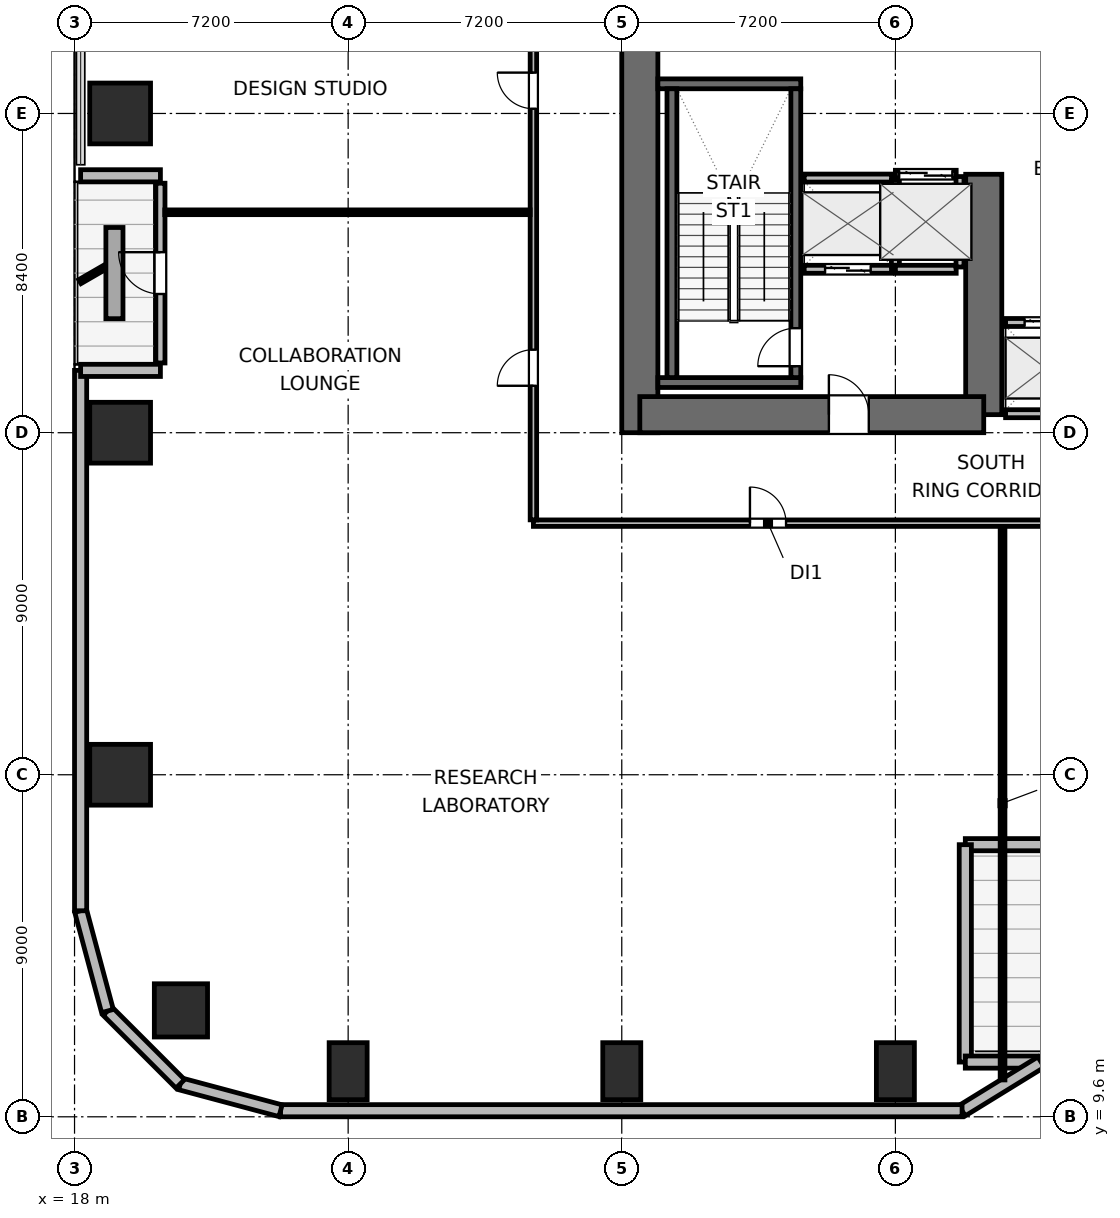
"""IFC4 building model, lengths in metres.
Left out: names, types, materials, properties, quantities, classifications, styles, units other than length and angle.
Written with IfcOpenShell. Run it as: python <this file> out.ifc"""

import sys

from ifc_helpers import new_model, si_unit, direction, frame, frame_2d, origin, origin_2d, place, context, subcontext, project, spatial, rectangle, circle, extrude, element, fill, save


model = new_model("IFC4")
c1 = context("Model", 3, precision=1e-05, world=origin(), true_north=direction((0.0, 1.0)))
c2 = subcontext(c1, "Body", "Model", "MODEL_VIEW")
j1 = project(units=[si_unit("LENGTHUNIT", "METRE"), si_unit("PLANEANGLEUNIT", "RADIAN")], contexts=[c1])
p1 = place(None, origin())
s1 = spatial("IfcSite", under=j1, at=p1, CompositionType="ELEMENT")
p2 = place(p1, origin())
s2 = spatial("IfcBuilding", under=s1, at=p2, CompositionType="ELEMENT")
p3 = place(p2, frame((0.0, 0.0, 68.4)))
s3 = spatial("IfcBuildingStorey", under=s2, at=p3, CompositionType="ELEMENT", Elevation=68.4)
p4 = place(p3, frame((32.875, 27.6, 0.0), z_axis=(0.0, 0.0, 1.0), x_axis=(0.0, 1.0, 0.0)))
e1 = element("IfcWall", 1, at=p4, inside=s3, PredefinedType="SHEAR", context=c2, shape_type="SweptSolid", body=[
    extrude(rectangle(XDim=16.8, YDim=0.95, at=frame_2d((8.4, 0.0))), origin(), (0.0, 0.0, 1.0), 4.5),
])
p5 = place(p3, frame((41.925, 28.075, 0.0), z_axis=(0.0, 0.0, 1.0), x_axis=(0.0, 1.0, 0.0)))
e2 = element("IfcWall", 2, at=p5, inside=s3, PredefinedType="SHEAR", context=c2, shape_type="SweptSolid", body=[
    extrude(rectangle(XDim=6.325, YDim=0.95, at=frame_2d((3.163, 0.0))), origin(), (0.0, 0.0, 1.0), 4.5),
])
p6 = place(p3, frame((32.875, 28.075, 0.0), z_axis=(0.0, 0.0, 1.0), x_axis=(1.0, 0.0, 0.0)))
e3 = element("IfcWall", 3, at=p6, inside=s3, PredefinedType="SHEAR", context=c2, shape_type="SweptSolid", body=[
    extrude(rectangle(XDim=9.05, YDim=0.95, at=frame_2d((4.525, 0.0))), origin(), (0.0, 0.0, 1.0), 4.5),
])
p7 = place(p6, frame((4.975, 0.0, 0.0)))
e4 = element("IfcOpeningElement", 4, at=p7, cuts=e3, PredefinedType="OPENING", context=c2, shape_type="SweptSolid", body=[
    extrude(rectangle(XDim=1.05, YDim=2.04, at=frame_2d((0.525, 1.02))), frame((0.0, 0.485, 0.0), z_axis=(0.0, -1.0, 0.0), x_axis=(1.0, 0.0, 0.0)), (0.0, 0.0, 1.0), 0.97),
])
for number, where, z_axis, x_axis in (
    (5, (33.35, 28.92, 0.0), (0.0, 0.0, 1.0), (1.0, 0.0, 0.0)),
    (6, (33.35, 36.78, 0.0), (0.0, 0.0, 1.0), (1.0, 0.0, 0.0)),
):
    element("IfcWall", number, at=place(p3, frame(where, z_axis=z_axis, x_axis=x_axis)), inside=s3, PredefinedType="SHEAR", context=c2, shape_type="SweptSolid", body=[
        extrude(rectangle(XDim=3.76, YDim=0.26, at=frame_2d((1.88, 0.0))), origin(), (0.0, 0.0, 1.0), 4.5),
    ])
p8 = place(p3, frame((33.72, 29.05, 0.0), z_axis=(0.0, 0.0, 1.0), x_axis=(0.0, 1.0, 0.0)))
e7 = element("IfcWall", 7, at=p8, inside=s3, PredefinedType="SHEAR", context=c2, shape_type="SweptSolid", body=[
    extrude(rectangle(XDim=7.6, YDim=0.26, at=frame_2d((3.8, 0.0))), origin(), (0.0, 0.0, 1.0), 4.5),
])
p9 = place(p3, frame((36.98, 29.05, 0.0), z_axis=(0.0, 0.0, 1.0), x_axis=(0.0, 1.0, 0.0)))
e8 = element("IfcWall", 8, at=p9, inside=s3, PredefinedType="SHEAR", context=c2, shape_type="SweptSolid", body=[
    extrude(rectangle(XDim=7.6, YDim=0.26, at=frame_2d((3.8, 0.0))), origin(), (0.0, 0.0, 1.0), 4.5),
])
p10 = place(p9, frame((0.3, 0.0, 0.0)))
e9 = element("IfcOpeningElement", 9, at=p10, cuts=e8, PredefinedType="OPENING", context=c2, shape_type="SweptSolid", body=[
    extrude(rectangle(XDim=1.0, YDim=2.04, at=frame_2d((0.5, 1.02))), frame((0.0, 0.14, 0.0), z_axis=(0.0, -1.0, 0.0), x_axis=(1.0, 0.0, 0.0)), (0.0, 0.0, 1.0), 0.28),
])
p11 = place(p3, frame((20.8, 12.4, 0.0), z_axis=(0.0, 0.0, 1.0), x_axis=(1.0, 0.0, 0.0)))
e10 = element("IfcColumn", 10, at=p11, inside=s3, PredefinedType="COLUMN", context=c2, shape_type="SweptSolid", body=[
    extrude(circle(Radius=0.7, at=origin_2d()), origin(), (0.0, 0.0, 1.0), 4.5),
])
for number, where, z_axis, x_axis in (
    (11, (25.2, 10.8, 0.0), (0.0, 0.0, 1.0), (1.0, 0.0, 0.0)),
    (12, (32.4, 10.8, 0.0), (0.0, 0.0, 1.0), (1.0, 0.0, 0.0)),
    (13, (39.6, 10.8, 0.0), (0.0, 0.0, 1.0), (1.0, 0.0, 0.0)),
):
    element("IfcColumn", number, at=place(p3, frame(where, z_axis=z_axis, x_axis=x_axis)), inside=s3, PredefinedType="COLUMN", context=c2, shape_type="SweptSolid", body=[
        extrude(rectangle(XDim=1.0, YDim=1.5, at=origin_2d()), origin(), (0.0, 0.0, 1.0), 4.5),
    ])
for number, where, z_axis, x_axis in (
    (14, (19.2, 18.6, 0.0), (0.0, 0.0, 1.0), (1.0, 0.0, 0.0)),
    (15, (19.2, 27.6, 0.0), (0.0, 0.0, 1.0), (1.0, 0.0, 0.0)),
    (16, (19.2, 36.0, 0.0), (0.0, 0.0, 1.0), (1.0, 0.0, 0.0)),
):
    element("IfcColumn", number, at=place(p3, frame(where, z_axis=z_axis, x_axis=x_axis)), inside=s3, PredefinedType="COLUMN", context=c2, shape_type="SweptSolid", body=[
        extrude(rectangle(XDim=1.6, YDim=1.6, at=origin_2d()), origin(), (0.0, 0.0, 1.0), 4.5),
    ])
p12 = place(p3, frame((54.56, 16.76, 0.0), z_axis=(0.0, 0.0, 1.0), x_axis=(-1.0, 0.0, 0.0)))
e17 = element("IfcWall", 17, at=p12, inside=s3, PredefinedType="SOLIDWALL", context=c2, shape_type="SweptSolid", body=[
    extrude(rectangle(XDim=13.12, YDim=0.32, at=frame_2d((6.56, 0.0))), origin(), (0.0, 0.0, 1.0), 3.53),
])
p13 = place(p3, frame((41.44, 16.76, 0.0), z_axis=(0.0, 0.0, 1.0), x_axis=(0.0, -1.0, 0.0)))
e18 = element("IfcWall", 18, at=p13, inside=s3, PredefinedType="SOLIDWALL", context=c2, shape_type="SweptSolid", body=[
    extrude(rectangle(XDim=5.72, YDim=0.32, at=frame_2d((2.86, 0.0))), origin(), (0.0, 0.0, 1.0), 3.475),
])
p14 = place(p3, frame((41.44, 11.04, 0.0), z_axis=(0.0, 0.0, 1.0), x_axis=(1.0, 0.0, 0.0)))
e19 = element("IfcWall", 19, at=p14, inside=s3, PredefinedType="SOLIDWALL", context=c2, shape_type="SweptSolid", body=[
    extrude(rectangle(XDim=1.995, YDim=0.32, at=frame_2d((0.998, 0.0))), origin(), (0.0, 0.0, 1.0), 3.475),
])
p15 = place(p3, frame((43.435, 11.04, 0.0), z_axis=(0.0, 0.0, 1.0), x_axis=(-0.8516617488, -0.524091848469, 0.0)))
e20 = element("IfcWall", 20, at=p15, inside=s3, PredefinedType="SOLIDWALL", context=c2, shape_type="SweptSolid", body=[
    extrude(rectangle(XDim=2.442, YDim=0.32, at=frame_2d((1.221, 0.0))), origin(), (0.0, 0.0, 1.0), 4.24),
])
p16 = place(p3, frame((41.355, 9.76, 0.0), z_axis=(0.0, 0.0, 1.0), x_axis=(-1.0, 0.0, 0.0)))
e21 = element("IfcWall", 21, at=p16, inside=s3, PredefinedType="SOLIDWALL", context=c2, shape_type="SweptSolid", body=[
    extrude(rectangle(XDim=17.934, YDim=0.32, at=frame_2d((8.967, 0.0))), origin(), (0.0, 0.0, 1.0), 4.24),
])
p17 = place(p3, frame((23.421, 9.76, 0.0), z_axis=(0.0, 0.0, 1.0), x_axis=(-0.965964405026, 0.25867502435, 0.0)))
e22 = element("IfcWall", 22, at=p17, inside=s3, PredefinedType="SOLIDWALL", context=c2, shape_type="SweptSolid", body=[
    extrude(rectangle(XDim=2.731, YDim=0.32, at=frame_2d((1.366, 0.0))), origin(), (0.0, 0.0, 1.0), 4.24),
])
p18 = place(p3, frame((20.783, 10.467, 0.0), z_axis=(0.0, 0.0, 1.0), x_axis=(-0.707106781187, 0.707106781187, 0.0)))
e23 = element("IfcWall", 23, at=p18, inside=s3, PredefinedType="SOLIDWALL", context=c2, shape_type="SweptSolid", body=[
    extrude(rectangle(XDim=2.71, YDim=0.32, at=frame_2d((1.355, 0.0))), origin(), (0.0, 0.0, 1.0), 4.24),
])
p19 = place(p3, frame((18.866, 12.383, 0.0), z_axis=(0.0, 0.0, 1.0), x_axis=(-0.25869736047, 0.965958423373, 0.0)))
e24 = element("IfcWall", 24, at=p19, inside=s3, PredefinedType="SOLIDWALL", context=c2, shape_type="SweptSolid", body=[
    extrude(rectangle(XDim=2.731, YDim=0.32, at=frame_2d((1.366, 0.0))), origin(), (0.0, 0.0, 1.0), 4.24),
])
p20 = place(p3, frame((18.16, 15.021, 0.0), z_axis=(0.0, 0.0, 1.0), x_axis=(0.0, 1.0, 0.0)))
e25 = element("IfcWall", 25, at=p20, inside=s3, PredefinedType="SOLIDWALL", context=c2, shape_type="SweptSolid", body=[
    extrude(rectangle(XDim=14.219, YDim=0.32, at=frame_2d((7.109, 0.0))), origin(), (0.0, 0.0, 1.0), 4.24),
])
p21 = place(p3, frame((18.16, 29.24, 0.0), z_axis=(0.0, 0.0, 1.0), x_axis=(1.0, 0.0, 0.0)))
e26 = element("IfcWall", 26, at=p21, inside=s3, PredefinedType="SOLIDWALL", context=c2, shape_type="SweptSolid", body=[
    extrude(rectangle(XDim=2.1, YDim=0.32, at=frame_2d((1.05, 0.0))), origin(), (0.0, 0.0, 1.0), 3.475),
])
p22 = place(p3, frame((20.26, 29.435, 0.0), z_axis=(0.0, 0.0, 1.0), x_axis=(0.0, 1.0, 0.0)))
e27 = element("IfcWall", 27, at=p22, inside=s3, PredefinedType="SOLIDWALL", context=c2, shape_type="SweptSolid", body=[
    extrude(rectangle(XDim=4.73, YDim=0.24, at=frame_2d((2.365, 0.0))), origin(), (0.0, 0.0, 1.0), 3.762),
])
p23 = place(p22, frame((1.815, 0.0, 0.0)))
e28 = element("IfcOpeningElement", 28, at=p23, cuts=e27, PredefinedType="OPENING", context=c2, shape_type="SweptSolid", body=[
    extrude(rectangle(XDim=1.1, YDim=2.04, at=frame_2d((0.55, 1.02))), frame((0.0, 0.13, 0.0), z_axis=(0.0, -1.0, 0.0), x_axis=(1.0, 0.0, 0.0)), (0.0, 0.0, 1.0), 0.26),
])
p24 = place(p3, frame((20.26, 34.36, 0.0), z_axis=(0.0, 0.0, 1.0), x_axis=(-1.0, 0.0, 0.0)))
e29 = element("IfcWall", 29, at=p24, inside=s3, PredefinedType="SOLIDWALL", context=c2, shape_type="SweptSolid", body=[
    extrude(rectangle(XDim=2.1, YDim=0.32, at=frame_2d((1.05, 0.0))), origin(), (0.0, 0.0, 1.0), 3.475),
])
p25 = place(p3, frame((37.2, 31.9, 0.0), z_axis=(0.0, 0.0, 1.0), x_axis=(1.0, 0.0, 0.0)))
e30 = element("IfcWall", 30, at=p25, inside=s3, PredefinedType="PARTITIONING", context=c2, shape_type="SweptSolid", body=[
    extrude(rectangle(XDim=2.3, YDim=0.21, at=frame_2d((1.15, 0.0))), origin(), (0.0, 0.0, 1.0), 4.24),
])
p26 = place(p25, frame((0.55, 0.0, 0.0)))
e31 = element("IfcOpeningElement", 31, at=p26, cuts=e30, PredefinedType="OPENING", context=c2, shape_type="SweptSolid", body=[
    extrude(rectangle(XDim=1.2, YDim=2.04, at=frame_2d((0.6, 1.02))), frame((0.0, 0.115, 0.0), z_axis=(0.0, -1.0, 0.0), x_axis=(1.0, 0.0, 0.0)), (0.0, 0.0, 1.0), 0.23),
])
p27 = place(p3, frame((37.2, 34.3, 0.0), z_axis=(0.0, 0.0, 1.0), x_axis=(1.0, 0.0, 0.0)))
e32 = element("IfcWall", 32, at=p27, inside=s3, PredefinedType="PARTITIONING", context=c2, shape_type="SweptSolid", body=[
    extrude(rectangle(XDim=2.3, YDim=0.21, at=frame_2d((1.15, 0.0))), origin(), (0.0, 0.0, 1.0), 4.24),
])
p28 = place(p3, frame((39.6, 31.96, 0.0), z_axis=(0.0, 0.0, 1.0), x_axis=(0.0, 1.0, 0.0)))
e33 = element("IfcWall", 33, at=p28, inside=s3, PredefinedType="PARTITIONING", context=c2, shape_type="SweptSolid", body=[
    extrude(rectangle(XDim=2.28, YDim=0.21, at=frame_2d((1.14, 0.0))), origin(), (0.0, 0.0, 1.0), 4.24),
])
p29 = place(p3, frame((39.6, 34.4, 0.0), z_axis=(0.0, 0.0, 1.0), x_axis=(1.0, 0.0, 0.0)))
e34 = element("IfcWall", 34, at=p29, inside=s3, PredefinedType="PARTITIONING", context=c2, shape_type="SweptSolid", body=[
    extrude(rectangle(XDim=1.6, YDim=0.21, at=frame_2d((0.8, 0.0))), origin(), (0.0, 0.0, 1.0), 4.24),
])
p30 = place(p29, frame((0.1, 0.0, 0.0)))
e35 = element("IfcOpeningElement", 35, at=p30, cuts=e34, PredefinedType="OPENING", context=c2, shape_type="SweptSolid", body=[
    extrude(rectangle(XDim=1.4, YDim=2.06, at=frame_2d((0.7, 1.03))), frame((0.0, 0.115, 0.0), z_axis=(0.0, -1.0, 0.0), x_axis=(1.0, 0.0, 0.0)), (0.0, 0.0, 1.0), 0.23),
])
p31 = place(p3, frame((39.6, 31.9, 0.0), z_axis=(0.0, 0.0, 1.0), x_axis=(1.0, 0.0, 0.0)))
e36 = element("IfcWall", 36, at=p31, inside=s3, PredefinedType="PARTITIONING", context=c2, shape_type="SweptSolid", body=[
    extrude(rectangle(XDim=1.6, YDim=0.21, at=frame_2d((0.8, 0.0))), origin(), (0.0, 0.0, 1.0), 4.24),
])
p32 = place(p3, frame((41.3, 31.96, 0.0), z_axis=(0.0, 0.0, 1.0), x_axis=(0.0, 1.0, 0.0)))
e37 = element("IfcWall", 37, at=p32, inside=s3, PredefinedType="PARTITIONING", context=c2, shape_type="SweptSolid", body=[
    extrude(rectangle(XDim=2.38, YDim=0.21, at=frame_2d((1.19, 0.0))), origin(), (0.0, 0.0, 1.0), 4.24),
])
p33 = place(p3, frame((42.5, 30.5, 0.0), z_axis=(0.0, 0.0, 1.0), x_axis=(1.0, 0.0, 0.0)))
e38 = element("IfcWall", 38, at=p33, inside=s3, PredefinedType="PARTITIONING", context=c2, shape_type="SweptSolid", body=[
    extrude(rectangle(XDim=2.1, YDim=0.21, at=frame_2d((1.05, 0.0))), origin(), (0.0, 0.0, 1.0), 4.24),
])
p34 = place(p33, frame((0.5, 0.0, 0.0)))
e39 = element("IfcOpeningElement", 39, at=p34, cuts=e38, PredefinedType="OPENING", context=c2, shape_type="SweptSolid", body=[
    extrude(rectangle(XDim=1.1, YDim=2.04, at=frame_2d((0.55, 1.02))), frame((0.0, 0.115, 0.0), z_axis=(0.0, -1.0, 0.0), x_axis=(1.0, 0.0, 0.0)), (0.0, 0.0, 1.0), 0.23),
])
p35 = place(p3, frame((42.5, 28.1, 0.0), z_axis=(0.0, 0.0, 1.0), x_axis=(1.0, 0.0, 0.0)))
e40 = element("IfcWall", 40, at=p35, inside=s3, PredefinedType="PARTITIONING", context=c2, shape_type="SweptSolid", body=[
    extrude(rectangle(XDim=2.1, YDim=0.21, at=frame_2d((1.05, 0.0))), origin(), (0.0, 0.0, 1.0), 3.125),
])
p36 = place(p3, frame((30.075, 25.22, 0.0), z_axis=(0.0, 0.0, 1.0), x_axis=(1.0, 0.0, 0.0)))
e41 = element("IfcWall", 41, at=p36, inside=s3, PredefinedType="PARTITIONING", context=c2, shape_type="SweptSolid", body=[
    extrude(rectangle(XDim=35.85, YDim=0.17, at=frame_2d((17.925, 0.0))), origin(), (0.0, 0.0, 1.0), 4.24),
])
p37 = place(p36, frame((5.698, 0.0, 0.0)))
e42 = element("IfcOpeningElement", 42, at=p37, cuts=e41, PredefinedType="OPENING", context=c2, shape_type="SweptSolid", body=[
    extrude(rectangle(XDim=0.95, YDim=2.04, at=frame_2d((0.475, 1.02))), frame((0.0, 0.095, 0.0), z_axis=(0.0, -1.0, 0.0), x_axis=(1.0, 0.0, 0.0)), (0.0, 0.0, 1.0), 0.19),
])
p38 = place(p36, frame((17.445, 0.0, 0.0)))
e43 = element("IfcOpeningElement", 43, at=p38, cuts=e41, PredefinedType="OPENING", context=c2, shape_type="SweptSolid", body=[
    extrude(rectangle(XDim=0.95, YDim=2.04, at=frame_2d((0.475, 1.02))), frame((0.0, 0.095, 0.0), z_axis=(0.0, -1.0, 0.0), x_axis=(1.0, 0.0, 0.0)), (0.0, 0.0, 1.0), 0.19),
])
p39 = place(p36, frame((29.198, 0.0, 0.0)))
e44 = element("IfcOpeningElement", 44, at=p39, cuts=e41, PredefinedType="OPENING", context=c2, shape_type="SweptSolid", body=[
    extrude(rectangle(XDim=0.95, YDim=2.04, at=frame_2d((0.475, 1.02))), frame((0.0, 0.095, 0.0), z_axis=(0.0, -1.0, 0.0), x_axis=(1.0, 0.0, 0.0)), (0.0, 0.0, 1.0), 0.19),
])
p40 = place(p3, frame((30.075, 25.307, 0.0), z_axis=(0.0, 0.0, 1.0), x_axis=(0.0, 1.0, 0.0)))
e45 = element("IfcWall", 45, at=p40, inside=s3, PredefinedType="PARTITIONING", context=c2, shape_type="SweptSolid", body=[
    extrude(rectangle(XDim=21.386, YDim=0.17, at=frame_2d((10.693, 0.0))), origin(), (0.0, 0.0, 1.0), 4.24),
])
p41 = place(p40, frame((3.528, 0.0, 0.0)))
e46 = element("IfcOpeningElement", 46, at=p41, cuts=e45, PredefinedType="OPENING", context=c2, shape_type="SweptSolid", body=[
    extrude(rectangle(XDim=0.95, YDim=2.04, at=frame_2d((0.475, 1.02))), frame((0.0, 0.095, 0.0), z_axis=(0.0, -1.0, 0.0), x_axis=(1.0, 0.0, 0.0)), (0.0, 0.0, 1.0), 0.19),
])
p42 = place(p40, frame((10.818, 0.0, 0.0)))
e47 = element("IfcOpeningElement", 47, at=p42, cuts=e45, PredefinedType="OPENING", context=c2, shape_type="SweptSolid", body=[
    extrude(rectangle(XDim=0.95, YDim=2.04, at=frame_2d((0.475, 1.02))), frame((0.0, 0.095, 0.0), z_axis=(0.0, -1.0, 0.0), x_axis=(1.0, 0.0, 0.0)), (0.0, 0.0, 1.0), 0.19),
])
p43 = place(p40, frame((17.508, 0.0, 0.0)))
e48 = element("IfcOpeningElement", 48, at=p43, cuts=e45, PredefinedType="OPENING", context=c2, shape_type="SweptSolid", body=[
    extrude(rectangle(XDim=0.95, YDim=2.04, at=frame_2d((0.475, 1.02))), frame((0.0, 0.095, 0.0), z_axis=(0.0, -1.0, 0.0), x_axis=(1.0, 0.0, 0.0)), (0.0, 0.0, 1.0), 0.19),
])
p44 = place(p3, frame((42.42, 10.57, 0.0), z_axis=(0.0, 0.0, 1.0), x_axis=(0.0, 1.0, 0.0)))
e49 = element("IfcWall", 49, at=p44, inside=s3, PredefinedType="PARTITIONING", context=c2, shape_type="SweptSolid", body=[
    extrude(rectangle(XDim=14.563, YDim=0.125, at=frame_2d((7.281, 0.0))), origin(), (0.0, 0.0, 1.0), 3.603),
])
p45 = place(p3, frame((20.375, 33.4, 0.0), z_axis=(0.0, 0.0, 1.0), x_axis=(1.0, 0.0, 0.0)))
e50 = element("IfcWall", 50, at=p45, inside=s3, PredefinedType="PARTITIONING", context=c2, shape_type="SweptSolid", body=[
    extrude(rectangle(XDim=9.613, YDim=0.125, at=frame_2d((4.807, 0.0))), origin(), (0.0, 0.0, 1.0), 4.24),
])
p46 = place(p23, origin())
e51 = element("IfcDoor", 51, at=p46, inside=s3, OperationType="SINGLE_SWING_RIGHT", PredefinedType="DOOR", context=c2, shape_type="SweptSolid", body=[
    extrude(rectangle(XDim=1.1, YDim=2.04, at=frame_2d((0.55, 1.02))), frame((0.0, 0.025, 0.0), z_axis=(0.0, -1.0, 0.0), x_axis=(1.0, 0.0, 0.0)), (0.0, 0.0, 1.0), 0.05),
])
fill(e28, e51)
p47 = place(p10, origin())
e52 = element("IfcDoor", 52, at=p47, inside=s3, OperationType="SINGLE_SWING_LEFT", PredefinedType="DOOR", context=c2, shape_type="SweptSolid", body=[
    extrude(rectangle(XDim=1.0, YDim=2.04, at=frame_2d((0.5, 1.02))), frame((0.0, 0.025, 0.0), z_axis=(0.0, -1.0, 0.0), x_axis=(1.0, 0.0, 0.0)), (0.0, 0.0, 1.0), 0.05),
])
fill(e9, e52)
p48 = place(p26, origin())
e53 = element("IfcDoor", 53, at=p48, inside=s3, OperationType="DOUBLE_DOOR_SLIDING", PredefinedType="DOOR", context=c2, shape_type="SweptSolid", body=[
    extrude(rectangle(XDim=1.2, YDim=2.04, at=frame_2d((0.6, 1.02))), frame((0.0, 0.025, 0.0), z_axis=(0.0, -1.0, 0.0), x_axis=(1.0, 0.0, 0.0)), (0.0, 0.0, 1.0), 0.05),
])
fill(e31, e53)
p49 = place(p30, origin())
e54 = element("IfcDoor", 54, at=p49, inside=s3, OperationType="DOUBLE_DOOR_SLIDING", PredefinedType="DOOR", context=c2, shape_type="SweptSolid", body=[
    extrude(rectangle(XDim=1.4, YDim=2.06, at=frame_2d((0.7, 1.03))), frame((0.0, 0.025, 0.0), z_axis=(0.0, -1.0, 0.0), x_axis=(1.0, 0.0, 0.0)), (0.0, 0.0, 1.0), 0.05),
])
fill(e35, e54)
p50 = place(p34, origin())
e55 = element("IfcDoor", 55, at=p50, inside=s3, OperationType="DOUBLE_DOOR_SLIDING", PredefinedType="DOOR", context=c2, shape_type="SweptSolid", body=[
    extrude(rectangle(XDim=1.1, YDim=2.04, at=frame_2d((0.55, 1.02))), frame((0.0, 0.025, 0.0), z_axis=(0.0, -1.0, 0.0), x_axis=(1.0, 0.0, 0.0)), (0.0, 0.0, 1.0), 0.05),
])
fill(e39, e55)
p51 = place(p7, origin())
e56 = element("IfcDoor", 56, at=p51, inside=s3, OperationType="SINGLE_SWING_LEFT", PredefinedType="DOOR", context=c2, shape_type="SweptSolid", body=[
    extrude(rectangle(XDim=1.05, YDim=2.04, at=frame_2d((0.525, 1.02))), frame((0.0, 0.025, 0.0), z_axis=(0.0, -1.0, 0.0), x_axis=(1.0, 0.0, 0.0)), (0.0, 0.0, 1.0), 0.05),
])
fill(e4, e56)
p52 = place(p37, origin())
e57 = element("IfcDoor", 57, at=p52, inside=s3, OperationType="SINGLE_SWING_LEFT", PredefinedType="DOOR", context=c2, shape_type="SweptSolid", body=[
    extrude(rectangle(XDim=0.95, YDim=2.04, at=frame_2d((0.475, 1.02))), frame((0.0, 0.025, 0.0), z_axis=(0.0, -1.0, 0.0), x_axis=(1.0, 0.0, 0.0)), (0.0, 0.0, 1.0), 0.05),
])
fill(e42, e57)
p53 = place(p41, origin())
e58 = element("IfcDoor", 58, at=p53, inside=s3, OperationType="SINGLE_SWING_LEFT", PredefinedType="DOOR", context=c2, shape_type="SweptSolid", body=[
    extrude(rectangle(XDim=0.95, YDim=2.04, at=frame_2d((0.475, 1.02))), frame((0.0, 0.025, 0.0), z_axis=(0.0, -1.0, 0.0), x_axis=(1.0, 0.0, 0.0)), (0.0, 0.0, 1.0), 0.05),
])
fill(e46, e58)
p54 = place(p42, origin())
e59 = element("IfcDoor", 59, at=p54, inside=s3, OperationType="SINGLE_SWING_RIGHT", PredefinedType="DOOR", context=c2, shape_type="SweptSolid", body=[
    extrude(rectangle(XDim=0.95, YDim=2.04, at=frame_2d((0.475, 1.02))), frame((0.0, 0.025, 0.0), z_axis=(0.0, -1.0, 0.0), x_axis=(1.0, 0.0, 0.0)), (0.0, 0.0, 1.0), 0.05),
])
fill(e47, e59)
save(model, sys.argv[1])
